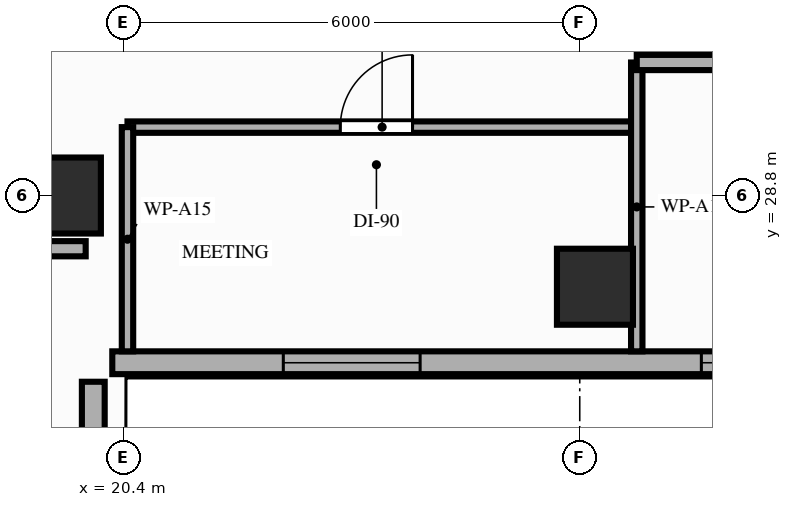
"""IFC4 building model, lengths in metres.
Left out: names, types, materials, properties, quantities, classifications, styles, units other than length and angle.
Written with IfcOpenShell. Run it as: python <this file> out.ifc"""

import sys

from ifc_helpers import new_model, si_unit, direction, frame, frame_2d, origin, origin_2d, place, context, subcontext, project, spatial, rectangle, extrude, element, fill, save


model = new_model("IFC4")
c1 = context("Model", 3, precision=1e-05, world=origin(), true_north=direction((0.0, 1.0)))
c2 = subcontext(c1, "Body", "Model", "MODEL_VIEW")
j1 = project(units=[si_unit("LENGTHUNIT", "METRE"), si_unit("PLANEANGLEUNIT", "RADIAN")], contexts=[c1])
p1 = place(None, origin())
s1 = spatial("IfcSite", under=j1, at=p1, CompositionType="ELEMENT")
p2 = place(p1, origin())
s2 = spatial("IfcBuilding", under=s1, at=p2, CompositionType="ELEMENT")
p3 = place(p2, frame((0.0, 0.0, 129.8)))
s3 = spatial("IfcBuildingStorey", under=s2, at=p3, CompositionType="ELEMENT", Elevation=129.8)
for number, where, z_axis, x_axis in (
    (1, (19.6, 28.8, 0.0), (0.0, 0.0, 1.0), (1.0, 0.0, 0.0)),
    (2, (26.6, 27.6, 0.0), (0.0, 0.0, 1.0), (1.0, 0.0, 0.0)),
):
    element("IfcColumn", number, at=place(p3, frame(where, z_axis=z_axis, x_axis=x_axis)), inside=s3, PredefinedType="COLUMN", context=c2, shape_type="SweptSolid", body=[
        extrude(rectangle(XDim=1.0, YDim=1.0, at=origin_2d()), origin(), (0.0, 0.0, 1.0), 3.2),
    ])
p4 = place(p3, frame((20.0, 8.8, 0.0), z_axis=(0.0, 0.0, 1.0), x_axis=(0.0, 1.0, 0.0)))
e3 = element("IfcWall", 3, at=p4, inside=s3, PredefinedType="STANDARD", context=c2, shape_type="SweptSolid", body=[
    extrude(rectangle(XDim=17.55, YDim=0.3, at=frame_2d((8.775, 0.0))), origin(), (0.0, 0.0, 1.0), 2.45),
])
p5 = place(p4, frame((9.94, 0.0, 0.85)))
e4 = element("IfcOpeningElement", 4, at=p5, cuts=e3, PredefinedType="OPENING", context=c2, shape_type="SweptSolid", body=[
    extrude(rectangle(XDim=1.1, YDim=1.35, at=frame_2d((0.55, 0.675))), frame((0.0, 0.16, 0.0), z_axis=(0.0, -1.0, 0.0), x_axis=(1.0, 0.0, 0.0)), (0.0, 0.0, 1.0), 0.32),
])
p6 = place(p3, frame((20.25, 26.6, 0.0), z_axis=(0.0, 0.0, 1.0), x_axis=(1.0, 0.0, 0.0)))
e5 = element("IfcWall", 5, at=p6, inside=s3, PredefinedType="STANDARD", context=c2, shape_type="SweptSolid", body=[
    extrude(rectangle(XDim=26.15, YDim=0.3, at=frame_2d((13.075, 0.0))), origin(), (0.0, 0.0, 1.0), 2.71),
])
p7 = place(p6, frame((13.9, 0.0, 0.0)))
e6 = element("IfcOpeningElement", 6, at=p7, cuts=e5, PredefinedType="OPENING", context=c2, shape_type="SweptSolid", body=[
    extrude(rectangle(XDim=1.3, YDim=2.08, at=frame_2d((0.65, 1.04))), frame((0.0, 0.16, 0.0), z_axis=(0.0, -1.0, 0.0), x_axis=(1.0, 0.0, 0.0)), (0.0, 0.0, 1.0), 0.32),
])
p8 = place(p6, frame((2.25, 0.0, 0.85)))
e7 = element("IfcOpeningElement", 7, at=p8, cuts=e5, PredefinedType="OPENING", context=c2, shape_type="SweptSolid", body=[
    extrude(rectangle(XDim=1.8, YDim=1.61, at=frame_2d((0.9, 0.805))), frame((0.0, 0.16, 0.0), z_axis=(0.0, -1.0, 0.0), x_axis=(1.0, 0.0, 0.0)), (0.0, 0.0, 1.0), 0.32),
])
p9 = place(p6, frame((7.75, 0.0, 0.85)))
e8 = element("IfcOpeningElement", 8, at=p9, cuts=e5, PredefinedType="OPENING", context=c2, shape_type="SweptSolid", body=[
    extrude(rectangle(XDim=1.8, YDim=1.61, at=frame_2d((0.9, 0.805))), frame((0.0, 0.16, 0.0), z_axis=(0.0, -1.0, 0.0), x_axis=(1.0, 0.0, 0.0)), (0.0, 0.0, 1.0), 0.32),
])
p10 = place(p6, frame((22.25, 0.0, 0.85)))
e9 = element("IfcOpeningElement", 9, at=p10, cuts=e5, PredefinedType="OPENING", context=c2, shape_type="SweptSolid", body=[
    extrude(rectangle(XDim=1.8, YDim=1.61, at=frame_2d((0.9, 0.805))), frame((0.0, 0.16, 0.0), z_axis=(0.0, -1.0, 0.0), x_axis=(1.0, 0.0, 0.0)), (0.0, 0.0, 1.0), 0.32),
])
p11 = place(p3, frame((11.01, 28.1, 0.0), z_axis=(0.0, 0.0, 1.0), x_axis=(1.0, 0.0, 0.0)))
e10 = element("IfcWall", 10, at=p11, inside=s3, PredefinedType="PARTITIONING", context=c2, shape_type="SweptSolid", body=[
    extrude(rectangle(XDim=8.89, YDim=0.2, at=frame_2d((4.445, 0.0))), origin(), (0.0, 0.0, 1.0), 2.45),
])
p12 = place(p3, frame((20.45, 29.7, 0.0), z_axis=(0.0, 0.0, 1.0), x_axis=(1.0, 0.0, 0.0)))
e11 = element("IfcWall", 11, at=p12, inside=s3, PredefinedType="PARTITIONING", context=c2, shape_type="SweptSolid", body=[
    extrude(rectangle(XDim=6.7, YDim=0.15, at=frame_2d((3.35, 0.0))), origin(), (0.0, 0.0, 1.0), 3.02),
])
p13 = place(p12, frame((2.8, 0.0, 0.0)))
e12 = element("IfcOpeningElement", 12, at=p13, cuts=e11, PredefinedType="OPENING", context=c2, shape_type="SweptSolid", body=[
    extrude(rectangle(XDim=0.95, YDim=2.15, at=frame_2d((0.475, 1.075))), frame((0.0, 0.085, 0.0), z_axis=(0.0, -1.0, 0.0), x_axis=(1.0, 0.0, 0.0)), (0.0, 0.0, 1.0), 0.17),
])
p14 = place(p3, frame((20.45, 26.75, 0.0), z_axis=(0.0, 0.0, 1.0), x_axis=(0.0, 1.0, 0.0)))
e13 = element("IfcWall", 13, at=p14, inside=s3, PredefinedType="PARTITIONING", context=c2, shape_type="SweptSolid", body=[
    extrude(rectangle(XDim=2.95, YDim=0.15, at=frame_2d((1.475, 0.0))), origin(), (0.0, 0.0, 1.0), 2.45),
])
p15 = place(p3, frame((27.15, 26.75, 0.0), z_axis=(0.0, 0.0, 1.0), x_axis=(0.0, 1.0, 0.0)))
e14 = element("IfcWall", 14, at=p15, inside=s3, PredefinedType="PARTITIONING", context=c2, shape_type="SweptSolid", body=[
    extrude(rectangle(XDim=3.8, YDim=0.15, at=frame_2d((1.9, 0.0))), origin(), (0.0, 0.0, 1.0), 2.45),
])
p16 = place(p3, frame((27.15, 30.55, 0.0), z_axis=(0.0, 0.0, 1.0), x_axis=(1.0, 0.0, 0.0)))
e15 = element("IfcWall", 15, at=p16, inside=s3, PredefinedType="PARTITIONING", context=c2, shape_type="SweptSolid", body=[
    extrude(rectangle(XDim=13.15, YDim=0.2, at=frame_2d((6.575, 0.0))), origin(), (0.0, 0.0, 1.0), 2.45),
])
p17 = place(p16, frame((2.09, 0.0, 0.0)))
e16 = element("IfcOpeningElement", 16, at=p17, cuts=e15, PredefinedType="OPENING", context=c2, shape_type="SweptSolid", body=[
    extrude(rectangle(XDim=0.95, YDim=2.15, at=frame_2d((0.475, 1.075))), frame((0.0, 0.11, 0.0), z_axis=(0.0, -1.0, 0.0), x_axis=(1.0, 0.0, 0.0)), (0.0, 0.0, 1.0), 0.22),
])
p18 = place(p16, frame((6.49, 0.0, 0.0)))
e17 = element("IfcOpeningElement", 17, at=p18, cuts=e15, PredefinedType="OPENING", context=c2, shape_type="SweptSolid", body=[
    extrude(rectangle(XDim=0.95, YDim=2.15, at=frame_2d((0.475, 1.075))), frame((0.0, 0.11, 0.0), z_axis=(0.0, -1.0, 0.0), x_axis=(1.0, 0.0, 0.0)), (0.0, 0.0, 1.0), 0.22),
])
p19 = place(p16, frame((10.5, 0.0, 0.0)))
e18 = element("IfcOpeningElement", 18, at=p19, cuts=e15, PredefinedType="OPENING", context=c2, shape_type="SweptSolid", body=[
    extrude(rectangle(XDim=0.95, YDim=2.15, at=frame_2d((0.475, 1.075))), frame((0.0, 0.11, 0.0), z_axis=(0.0, -1.0, 0.0), x_axis=(1.0, 0.0, 0.0)), (0.0, 0.0, 1.0), 0.22),
])
p20 = place(p8, origin())
e19 = element("IfcWindow", 19, at=p20, inside=s3, PartitioningType="SINGLE_PANEL", PredefinedType="WINDOW", context=c2, shape_type="SweptSolid", body=[
    extrude(rectangle(XDim=1.8, YDim=1.61, at=frame_2d((0.9, 0.805))), frame((0.0, 0.03, 0.0), z_axis=(0.0, -1.0, 0.0), x_axis=(1.0, 0.0, 0.0)), (0.0, 0.0, 1.0), 0.06),
])
fill(e7, e19)
p21 = place(p9, origin())
e20 = element("IfcWindow", 20, at=p21, inside=s3, PartitioningType="SINGLE_PANEL", PredefinedType="WINDOW", context=c2, shape_type="SweptSolid", body=[
    extrude(rectangle(XDim=1.8, YDim=1.61, at=frame_2d((0.9, 0.805))), frame((0.0, 0.03, 0.0), z_axis=(0.0, -1.0, 0.0), x_axis=(1.0, 0.0, 0.0)), (0.0, 0.0, 1.0), 0.06),
])
fill(e8, e20)
p22 = place(p13, origin())
e21 = element("IfcDoor", 21, at=p22, inside=s3, OperationType="SINGLE_SWING_RIGHT", PredefinedType="DOOR", context=c2, shape_type="SweptSolid", body=[
    extrude(rectangle(XDim=0.95, YDim=2.15, at=frame_2d((0.475, 1.075))), frame((0.0, 0.025, 0.0), z_axis=(0.0, -1.0, 0.0), x_axis=(1.0, 0.0, 0.0)), (0.0, 0.0, 1.0), 0.05),
])
fill(e12, e21)
save(model, sys.argv[1])
